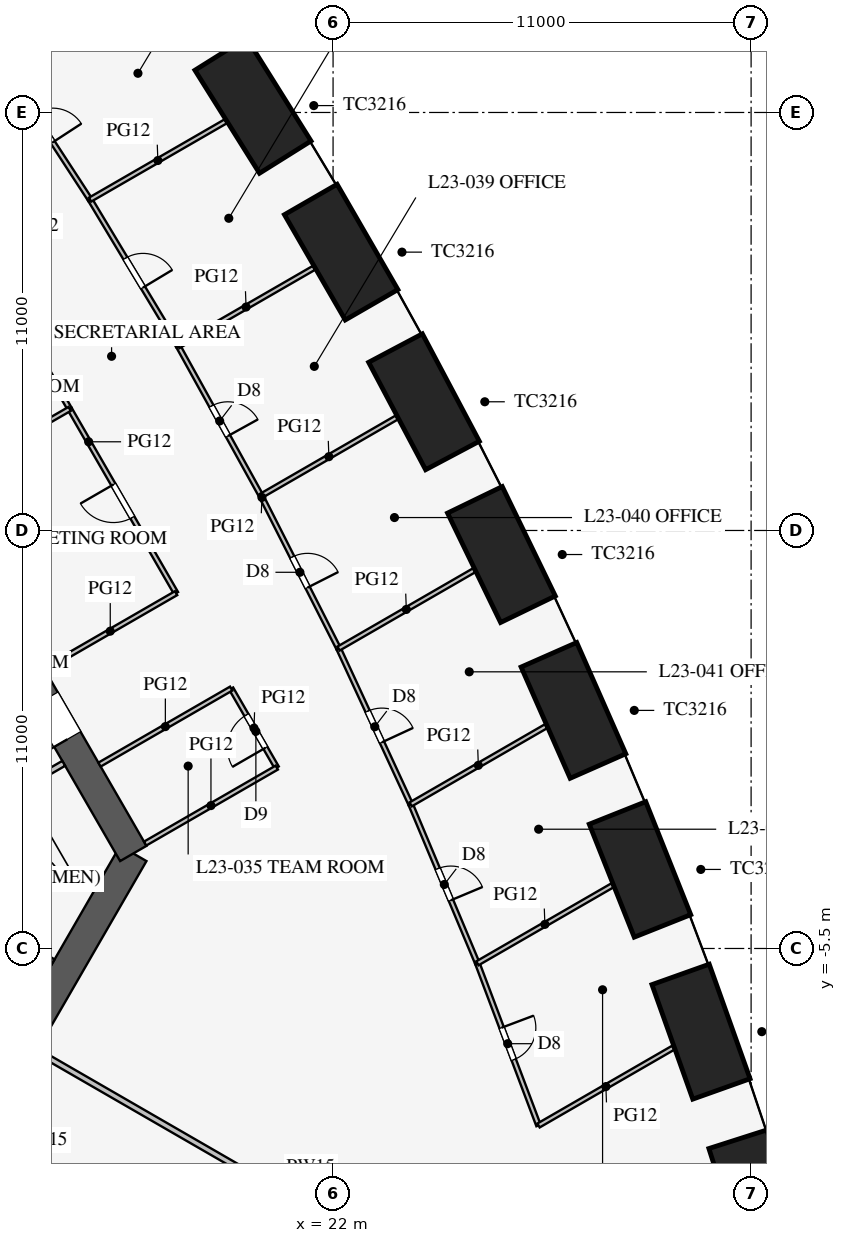
"""IFC4 building model, lengths in metres.
Left out: names, types, materials, properties, quantities, classifications, styles, units other than length and angle.
Written with IfcOpenShell. Run it as: python <this file> out.ifc"""

import sys

from ifc_helpers import new_model, si_unit, direction, frame, frame_2d, origin, origin_2d, place, context, subcontext, project, spatial, rectangle, extrude, element, fill, save


model = new_model("IFC4")
c1 = context("Model", 3, precision=1e-05, world=origin(), true_north=direction((0.0, 1.0)))
c2 = subcontext(c1, "Body", "Model", "MODEL_VIEW")
j1 = project(units=[si_unit("LENGTHUNIT", "METRE"), si_unit("PLANEANGLEUNIT", "RADIAN")], contexts=[c1])
p1 = place(None, origin())
s1 = spatial("IfcSite", under=j1, at=p1, CompositionType="ELEMENT")
p2 = place(p1, origin())
s2 = spatial("IfcBuilding", under=s1, at=p2, CompositionType="ELEMENT")
p3 = place(p2, frame((0.0, 0.0, 103.1)))
s3 = spatial("IfcBuildingStorey", under=s2, at=p3, CompositionType="ELEMENT", Elevation=103.1)
for number, where, z_axis, x_axis in (
    (1, (33.139, -12.044, 0.0), (0.0, 0.0, 1.0), (-0.305, 0.952, 0.0)),
    (2, (31.682, -7.689, 0.0), (0.0, 0.0, 1.0), (-0.336, 0.942, 0.0)),
    (3, (30.077, -3.42, 0.0), (0.0, 0.0, 1.0), (-0.37, 0.929, 0.0)),
    (4, (28.325, 0.765, 0.0), (0.0, 0.0, 1.0), (-0.403, 0.915, 0.0)),
    (5, (26.43, 4.867, 0.0), (0.0, 0.0, 1.0), (-0.436, 0.9, 0.0)),
    (6, (24.393, 8.887, 0.0), (0.0, 0.0, 1.0), (-0.468, 0.883, 0.0)),
    (7, (22.213, 12.825, 0.0), (0.0, 0.0, 1.0), (-0.5, 0.866, 0.0)),
    (8, (19.893, 16.681, 0.0), (0.0, 0.0, 1.0), (-0.531, 0.847, 0.0)),
):
    element("IfcColumn", number, at=place(p3, frame(where, z_axis=z_axis, x_axis=x_axis)), inside=s3, PredefinedType="COLUMN", context=c2, shape_type="SweptSolid", body=[
        extrude(rectangle(XDim=3.2, YDim=1.6, at=origin_2d()), origin(), (0.0, 0.0, 1.0), 4.2),
    ])
p4 = place(p3, frame((10.97, -13.0, 0.0), z_axis=(0.0, 0.0, 1.0), x_axis=(0.499995765644, 0.866027848477, 0.0)))
e9 = element("IfcWall", 9, at=p4, inside=s3, PredefinedType="SHEAR", context=c2, shape_type="SweptSolid", body=[
    extrude(rectangle(XDim=11.547, YDim=0.8, at=frame_2d((5.773, 0.0))), origin(), (0.0, 0.0, 1.0), 4.2),
])
p5 = place(p3, frame((16.743, -3.0, 0.0), z_axis=(0.0, 0.0, 1.0), x_axis=(-0.500002442456, 0.866023993627, 0.0)))
e10 = element("IfcWall", 10, at=p5, inside=s3, PredefinedType="SHEAR", context=c2, shape_type="SweptSolid", body=[
    extrude(rectangle(XDim=21.939, YDim=0.8, at=frame_2d((10.97, 0.0))), origin(), (0.0, 0.0, 1.0), 4.2),
])
p6 = place(p5, frame((17.27, 0.0, 0.0)))
e11 = element("IfcOpeningElement", 11, at=p6, cuts=e10, PredefinedType="OPENING", context=c2, shape_type="SweptSolid", body=[
    extrude(rectangle(XDim=1.2, YDim=2.1, at=frame_2d((0.6, 1.05))), frame((0.0, 0.41, 0.0), z_axis=(0.0, -1.0, 0.0), x_axis=(1.0, 0.0, 0.0)), (0.0, 0.0, 1.0), 0.82),
])
p7 = place(p5, frame((3.47, 0.0, 0.0)))
e12 = element("IfcOpeningElement", 12, at=p7, cuts=e10, PredefinedType="OPENING", context=c2, shape_type="SweptSolid", body=[
    extrude(rectangle(XDim=1.2, YDim=2.1, at=frame_2d((0.6, 1.05))), frame((0.0, 0.41, 0.0), z_axis=(0.0, -1.0, 0.0), x_axis=(1.0, 0.0, 0.0)), (0.0, 0.0, 1.0), 0.82),
])
p8 = place(p3, frame((6.663, -1.509, 0.0), z_axis=(0.0, 0.0, 1.0), x_axis=(0.866019375473, -0.500010441196, 0.0)))
e13 = element("IfcWall", 13, at=p8, inside=s3, PredefinedType="SHEAR", context=c2, shape_type="SweptSolid", body=[
    extrude(rectangle(XDim=9.075, YDim=0.6, at=frame_2d((4.538, 0.0))), origin(), (0.0, 0.0, 1.0), 4.2),
])
p9 = place(p3, frame((10.495, -3.178, 0.0), z_axis=(0.0, 0.0, 1.0), x_axis=(0.86602216432, 0.500005610874, 0.0)))
e14 = element("IfcWall", 14, at=p9, inside=s3, PredefinedType="PARTITIONING", context=c2, shape_type="SweptSolid", body=[
    extrude(rectangle(XDim=5.1, YDim=0.15, at=frame_2d((2.55, 0.0))), origin(), (0.0, 0.0, 1.0), 4.0),
])
p10 = place(p9, frame((2.6, 0.0, 0.0)))
e15 = element("IfcOpeningElement", 15, at=p10, cuts=e14, PredefinedType="OPENING", context=c2, shape_type="SweptSolid", body=[
    extrude(rectangle(XDim=0.9, YDim=2.1, at=frame_2d((0.45, 1.05))), frame((0.0, 0.085, 0.0), z_axis=(0.0, -1.0, 0.0), x_axis=(1.0, 0.0, 0.0)), (0.0, 0.0, 1.0), 0.17),
])
p11 = place(p3, frame((14.203, -8.2, 0.0), z_axis=(0.0, 0.0, 1.0), x_axis=(0.866024668836, -0.500001272966, 0.0)))
e16 = element("IfcWall", 16, at=p11, inside=s3, PredefinedType="PARTITIONING", context=c2, shape_type="SweptSolid", body=[
    extrude(rectangle(XDim=16.65, YDim=0.15, at=frame_2d((8.325, 0.0))), origin(), (0.0, 0.0, 1.0), 2.3),
])
p12 = place(p3, frame((15.069, 8.7, 0.0), z_axis=(0.0, 0.0, 1.0), x_axis=(-0.500012057535, 0.866018442252, 0.0)))
e17 = element("IfcWall", 17, at=p12, inside=s3, PredefinedType="PARTITIONING", context=c2, shape_type="SweptSolid", body=[
    extrude(rectangle(XDim=3.6, YDim=0.12, at=frame_2d((1.8, 0.0))), origin(), (0.0, 0.0, 1.0), 2.9),
])
p13 = place(p12, frame((1.3, 0.0, 0.15)))
e18 = element("IfcOpeningElement", 18, at=p13, cuts=e17, PredefinedType="OPENING", context=c2, shape_type="SweptSolid", body=[
    extrude(rectangle(XDim=1.0, YDim=2.1, at=frame_2d((0.5, 1.05))), frame((0.0, 0.07, 0.0), z_axis=(0.0, -1.0, 0.0), x_axis=(1.0, 0.0, 0.0)), (0.0, 0.0, 1.0), 0.14),
])
p14 = place(p3, frame((20.519, -0.74, 0.0), z_axis=(0.0, 0.0, 1.0), x_axis=(-0.499957262057, 0.866050077142, 0.0)))
e19 = element("IfcWall", 19, at=p14, inside=s3, PredefinedType="PARTITIONING", context=c2, shape_type="SweptSolid", body=[
    extrude(rectangle(XDim=2.4, YDim=0.12, at=frame_2d((1.2, 0.0))), origin(), (0.0, 0.0, 1.0), 2.9),
])
p15 = place(p14, frame((0.6, 0.0, 0.15)))
e20 = element("IfcOpeningElement", 20, at=p15, cuts=e19, PredefinedType="OPENING", context=c2, shape_type="SweptSolid", body=[
    extrude(rectangle(XDim=1.0, YDim=2.1, at=frame_2d((0.5, 1.05))), frame((0.0, 0.07, 0.0), z_axis=(0.0, -1.0, 0.0), x_axis=(1.0, 0.0, 0.0)), (0.0, 0.0, 1.0), 0.14),
])
p16 = place(p3, frame((17.869, 3.85, 0.0), z_axis=(0.0, 0.0, 1.0), x_axis=(-0.500016814911, 0.866015695474, 0.0)))
e21 = element("IfcWall", 21, at=p16, inside=s3, PredefinedType="PARTITIONING", context=c2, shape_type="SweptSolid", body=[
    extrude(rectangle(XDim=5.6, YDim=0.12, at=frame_2d((2.8, 0.0))), origin(), (0.0, 0.0, 1.0), 2.9),
])
p17 = place(p16, frame((2.3, 0.0, 0.15)))
e22 = element("IfcOpeningElement", 22, at=p17, cuts=e21, PredefinedType="OPENING", context=c2, shape_type="SweptSolid", body=[
    extrude(rectangle(XDim=1.0, YDim=2.1, at=frame_2d((0.5, 1.05))), frame((0.0, 0.07, 0.0), z_axis=(0.0, -1.0, 0.0), x_axis=(1.0, 0.0, 0.0)), (0.0, 0.0, 1.0), 0.14),
])
p18 = place(p3, frame((11.605, 6.7, 0.0), z_axis=(0.0, 0.0, 1.0), x_axis=(0.866026010844, 0.49999894854, 0.0)))
e23 = element("IfcWall", 23, at=p18, inside=s3, PredefinedType="PARTITIONING", context=c2, shape_type="SweptSolid", body=[
    extrude(rectangle(XDim=4.0, YDim=0.12, at=frame_2d((2.0, 0.0))), origin(), (0.0, 0.0, 1.0), 2.4),
])
for number, where, z_axis, x_axis in (
    (24, (17.055, -2.74, 0.0), (0.0, 0.0, 1.0), (0.866, 0.5, 0.0)),
    (25, (14.405, 1.85, 0.0), (0.0, 0.0, 1.0), (0.866, 0.5, 0.0)),
    (26, (15.855, -0.661, 0.0), (0.0, 0.0, 1.0), (0.866, 0.5, 0.0)),
):
    element("IfcWall", number, at=place(p3, frame(where, z_axis=z_axis, x_axis=x_axis)), inside=s3, PredefinedType="PARTITIONING", context=c2, shape_type="SweptSolid", body=[
        extrude(rectangle(XDim=4.0, YDim=0.12, at=frame_2d((2.0, 0.0))), origin(), (0.0, 0.0, 1.0), 2.9),
    ])
p19 = place(p3, frame((17.927, 10.35, 0.0), z_axis=(0.0, 0.0, 1.0), x_axis=(-0.515548366618, 0.856860479703, 0.0)))
e27 = element("IfcWall", 27, at=p19, inside=s3, PredefinedType="PARTITIONING", context=c2, shape_type="SweptSolid", body=[
    extrude(rectangle(XDim=4.501, YDim=0.12, at=frame_2d((2.25, 0.0))), origin(), (0.0, 0.0, 1.0), 2.9),
])
p20 = place(p19, frame((1.8, 0.0, 0.15)))
e28 = element("IfcOpeningElement", 28, at=p20, cuts=e27, PredefinedType="OPENING", context=c2, shape_type="SweptSolid", body=[
    extrude(rectangle(XDim=0.9, YDim=2.1, at=frame_2d((0.45, 1.05))), frame((0.0, 0.07, 0.0), z_axis=(0.0, -1.0, 0.0), x_axis=(1.0, 0.0, 0.0)), (0.0, 0.0, 1.0), 0.14),
])
p21 = place(p3, frame((15.606, 14.206, 0.0), z_axis=(0.0, 0.0, 1.0), x_axis=(-0.546069464151, 0.837739900161, 0.0)))
e29 = element("IfcWall", 29, at=p21, inside=s3, PredefinedType="PARTITIONING", context=c2, shape_type="SweptSolid", body=[
    extrude(rectangle(XDim=4.507, YDim=0.12, at=frame_2d((2.253, 0.0))), origin(), (0.0, 0.0, 1.0), 2.9),
])
p22 = place(p21, frame((1.8, 0.0, 0.15)))
e30 = element("IfcOpeningElement", 30, at=p22, cuts=e29, PredefinedType="OPENING", context=c2, shape_type="SweptSolid", body=[
    extrude(rectangle(XDim=0.9, YDim=2.1, at=frame_2d((0.45, 1.05))), frame((0.0, 0.07, 0.0), z_axis=(0.0, -1.0, 0.0), x_axis=(1.0, 0.0, 0.0)), (0.0, 0.0, 1.0), 0.14),
])
p23 = place(p3, frame((24.043, -1.708, 0.0), z_axis=(0.0, 0.0, 1.0), x_axis=(-0.41992827805, 0.90755729367, 0.0)))
e31 = element("IfcWall", 31, at=p23, inside=s3, PredefinedType="PARTITIONING", context=c2, shape_type="SweptSolid", body=[
    extrude(rectangle(XDim=4.519, YDim=0.12, at=frame_2d((2.259, 0.0))), origin(), (0.0, 0.0, 1.0), 2.9),
])
p24 = place(p23, frame((1.8, 0.0, 0.15)))
e32 = element("IfcOpeningElement", 32, at=p24, cuts=e31, PredefinedType="OPENING", context=c2, shape_type="SweptSolid", body=[
    extrude(rectangle(XDim=0.9, YDim=2.1, at=frame_2d((0.45, 1.05))), frame((0.0, 0.07, 0.0), z_axis=(0.0, -1.0, 0.0), x_axis=(1.0, 0.0, 0.0)), (0.0, 0.0, 1.0), 0.14),
])
p25 = place(p3, frame((25.797, -5.891, 0.0), z_axis=(0.0, 0.0, 1.0), x_axis=(-0.386762112496, 0.922179520667, 0.0)))
e33 = element("IfcWall", 33, at=p25, inside=s3, PredefinedType="PARTITIONING", context=c2, shape_type="SweptSolid", body=[
    extrude(rectangle(XDim=4.536, YDim=0.12, at=frame_2d((2.268, 0.0))), origin(), (0.0, 0.0, 1.0), 2.9),
])
p26 = place(p25, frame((1.8, 0.0, 0.15)))
e34 = element("IfcOpeningElement", 34, at=p26, cuts=e33, PredefinedType="OPENING", context=c2, shape_type="SweptSolid", body=[
    extrude(rectangle(XDim=0.9, YDim=2.1, at=frame_2d((0.45, 1.05))), frame((0.0, 0.07, 0.0), z_axis=(0.0, -1.0, 0.0), x_axis=(1.0, 0.0, 0.0)), (0.0, 0.0, 1.0), 0.14),
])
p27 = place(p3, frame((27.406, -10.158, 0.0), z_axis=(0.0, 0.0, 1.0), x_axis=(-0.352894560512, 0.93566309597, 0.0)))
e35 = element("IfcWall", 35, at=p27, inside=s3, PredefinedType="PARTITIONING", context=c2, shape_type="SweptSolid", body=[
    extrude(rectangle(XDim=4.561, YDim=0.12, at=frame_2d((2.28, 0.0))), origin(), (0.0, 0.0, 1.0), 2.9),
])
p28 = place(p27, frame((1.85, 0.0, 0.15)))
e36 = element("IfcOpeningElement", 36, at=p28, cuts=e35, PredefinedType="OPENING", context=c2, shape_type="SweptSolid", body=[
    extrude(rectangle(XDim=0.9, YDim=2.1, at=frame_2d((0.45, 1.05))), frame((0.0, 0.07, 0.0), z_axis=(0.0, -1.0, 0.0), x_axis=(1.0, 0.0, 0.0)), (0.0, 0.0, 1.0), 0.14),
])
p29 = place(p3, frame((20.106, 6.412, 0.0), z_axis=(0.0, 0.0, 1.0), x_axis=(-0.484292898211, 0.874905931368, 0.0)))
e37 = element("IfcWall", 37, at=p29, inside=s3, PredefinedType="PARTITIONING", context=c2, shape_type="SweptSolid", body=[
    extrude(rectangle(XDim=4.501, YDim=0.12, at=frame_2d((2.25, 0.0))), origin(), (0.0, 0.0, 1.0), 2.9),
])
p30 = place(p29, frame((1.8, 0.0, 0.15)))
e38 = element("IfcOpeningElement", 38, at=p30, cuts=e37, PredefinedType="OPENING", context=c2, shape_type="SweptSolid", body=[
    extrude(rectangle(XDim=0.9, YDim=2.1, at=frame_2d((0.45, 1.05))), frame((0.0, 0.07, 0.0), z_axis=(0.0, -1.0, 0.0), x_axis=(1.0, 0.0, 0.0)), (0.0, 0.0, 1.0), 0.14),
])
p31 = place(p3, frame((22.145, 2.393, 0.0), z_axis=(0.0, 0.0, 1.0), x_axis=(-0.452471679136, 0.891778772779, 0.0)))
e39 = element("IfcWall", 39, at=p31, inside=s3, PredefinedType="PARTITIONING", context=c2, shape_type="SweptSolid", body=[
    extrude(rectangle(XDim=4.507, YDim=0.12, at=frame_2d((2.253, 0.0))), origin(), (0.0, 0.0, 1.0), 2.9),
])
p32 = place(p31, frame((1.8, 0.0, 0.15)))
e40 = element("IfcOpeningElement", 40, at=p32, cuts=e39, PredefinedType="OPENING", context=c2, shape_type="SweptSolid", body=[
    extrude(rectangle(XDim=0.9, YDim=2.1, at=frame_2d((0.45, 1.05))), frame((0.0, 0.07, 0.0), z_axis=(0.0, -1.0, 0.0), x_axis=(1.0, 0.0, 0.0)), (0.0, 0.0, 1.0), 0.14),
])
p33 = place(p3, frame((17.927, 10.35, 0.0), z_axis=(0.0, 0.0, 1.0), x_axis=(0.866009926209, 0.50002680699, 0.0)))
e41 = element("IfcWall", 41, at=p33, inside=s3, PredefinedType="PARTITIONING", context=c2, shape_type="SweptSolid", body=[
    extrude(rectangle(XDim=4.12, YDim=0.12, at=frame_2d((2.06, 0.0))), origin(), (0.0, 0.0, 1.0), 2.4),
])
p34 = place(p3, frame((15.606, 14.206, 0.0), z_axis=(0.0, 0.0, 1.0), x_axis=(0.866016800201, 0.500014901547, 0.0)))
e42 = element("IfcWall", 42, at=p34, inside=s3, PredefinedType="PARTITIONING", context=c2, shape_type="SweptSolid", body=[
    extrude(rectangle(XDim=4.119, YDim=0.12, at=frame_2d((2.06, 0.0))), origin(), (0.0, 0.0, 1.0), 2.4),
])
p35 = place(p3, frame((13.145, 17.982, 0.0), z_axis=(0.0, 0.0, 1.0), x_axis=(0.866018637367, 0.500011719595, 0.0)))
e43 = element("IfcWall", 43, at=p35, inside=s3, PredefinedType="PARTITIONING", context=c2, shape_type="SweptSolid", body=[
    extrude(rectangle(XDim=4.116, YDim=0.12, at=frame_2d((2.058, 0.0))), origin(), (0.0, 0.0, 1.0), 2.6),
])
p36 = place(p3, frame((24.043, -1.708, 0.0), z_axis=(0.0, 0.0, 1.0), x_axis=(0.866019409031, 0.500010383074, 0.0)))
e44 = element("IfcWall", 44, at=p36, inside=s3, PredefinedType="PARTITIONING", context=c2, shape_type="SweptSolid", body=[
    extrude(rectangle(XDim=4.11, YDim=0.12, at=frame_2d((2.055, 0.0))), origin(), (0.0, 0.0, 1.0), 2.2),
])
p37 = place(p3, frame((25.797, -5.891, 0.0), z_axis=(0.0, 0.0, 1.0), x_axis=(0.866019112135, 0.500010897298, 0.0)))
e45 = element("IfcWall", 45, at=p37, inside=s3, PredefinedType="PARTITIONING", context=c2, shape_type="SweptSolid", body=[
    extrude(rectangle(XDim=4.103, YDim=0.12, at=frame_2d((2.052, 0.0))), origin(), (0.0, 0.0, 1.0), 2.4),
])
p38 = place(p3, frame((27.406, -10.158, 0.0), z_axis=(0.0, 0.0, 1.0), x_axis=(0.86601374377, 0.500020195194, 0.0)))
e46 = element("IfcWall", 46, at=p38, inside=s3, PredefinedType="PARTITIONING", context=c2, shape_type="SweptSolid", body=[
    extrude(rectangle(XDim=4.093, YDim=0.12, at=frame_2d((2.046, 0.0))), origin(), (0.0, 0.0, 1.0), 2.6),
])
p39 = place(p3, frame((20.106, 6.412, 0.0), z_axis=(0.0, 0.0, 1.0), x_axis=(0.866016800201, 0.500014901547, 0.0)))
e47 = element("IfcWall", 47, at=p39, inside=s3, PredefinedType="PARTITIONING", context=c2, shape_type="SweptSolid", body=[
    extrude(rectangle(XDim=4.119, YDim=0.12, at=frame_2d((2.06, 0.0))), origin(), (0.0, 0.0, 1.0), 2.4),
])
p40 = place(p3, frame((22.145, 2.393, 0.0), z_axis=(0.0, 0.0, 1.0), x_axis=(0.866018637367, 0.500011719595, 0.0)))
e48 = element("IfcWall", 48, at=p40, inside=s3, PredefinedType="PARTITIONING", context=c2, shape_type="SweptSolid", body=[
    extrude(rectangle(XDim=4.116, YDim=0.12, at=frame_2d((2.058, 0.0))), origin(), (0.0, 0.0, 1.0), 2.6),
])
p41 = place(p7, origin())
e49 = element("IfcDoor", 49, at=p41, inside=s3, OperationType="SINGLE_SWING_LEFT", PredefinedType="DOOR", context=c2, shape_type="SweptSolid", body=[
    extrude(rectangle(XDim=1.2, YDim=2.1, at=frame_2d((0.6, 1.05))), frame((0.0, 0.025, 0.0), z_axis=(0.0, -1.0, 0.0), x_axis=(1.0, 0.0, 0.0)), (0.0, 0.0, 1.0), 0.05),
])
fill(e12, e49)
p42 = place(p17, origin())
e50 = element("IfcDoor", 50, at=p42, inside=s3, OperationType="SINGLE_SWING_RIGHT", PredefinedType="DOOR", context=c2, shape_type="SweptSolid", body=[
    extrude(rectangle(XDim=1.0, YDim=2.1, at=frame_2d((0.5, 1.05))), frame((0.0, 0.025, 0.0), z_axis=(0.0, -1.0, 0.0), x_axis=(1.0, 0.0, 0.0)), (0.0, 0.0, 1.0), 0.05),
])
fill(e22, e50)
p43 = place(p15, origin())
e51 = element("IfcDoor", 51, at=p43, inside=s3, OperationType="SINGLE_SWING_LEFT", PredefinedType="DOOR", context=c2, shape_type="SweptSolid", body=[
    extrude(rectangle(XDim=1.0, YDim=2.1, at=frame_2d((0.5, 1.05))), frame((0.0, 0.025, 0.0), z_axis=(0.0, -1.0, 0.0), x_axis=(1.0, 0.0, 0.0)), (0.0, 0.0, 1.0), 0.05),
])
fill(e20, e51)
p44 = place(p22, frame((0.9, 0.0, 0.0), z_axis=(0.0, 0.0, 1.0), x_axis=(-1.0, 0.0, 0.0)))
e52 = element("IfcDoor", 52, at=p44, inside=s3, OperationType="SINGLE_SWING_RIGHT", PredefinedType="DOOR", context=c2, shape_type="SweptSolid", body=[
    extrude(rectangle(XDim=0.9, YDim=2.1, at=frame_2d((0.45, 1.05))), frame((0.0, 0.025, 0.0), z_axis=(0.0, -1.0, 0.0), x_axis=(1.0, 0.0, 0.0)), (0.0, 0.0, 1.0), 0.05),
])
fill(e30, e52)
p45 = place(p20, frame((0.9, 0.0, 0.0), z_axis=(0.0, 0.0, 1.0), x_axis=(-1.0, 0.0, 0.0)))
e53 = element("IfcDoor", 53, at=p45, inside=s3, OperationType="SINGLE_SWING_RIGHT", PredefinedType="DOOR", context=c2, shape_type="SweptSolid", body=[
    extrude(rectangle(XDim=0.9, YDim=2.1, at=frame_2d((0.45, 1.05))), frame((0.0, 0.025, 0.0), z_axis=(0.0, -1.0, 0.0), x_axis=(1.0, 0.0, 0.0)), (0.0, 0.0, 1.0), 0.05),
])
fill(e28, e53)
p46 = place(p30, frame((0.9, 0.0, 0.0), z_axis=(0.0, 0.0, 1.0), x_axis=(-1.0, 0.0, 0.0)))
e54 = element("IfcDoor", 54, at=p46, inside=s3, OperationType="SINGLE_SWING_RIGHT", PredefinedType="DOOR", context=c2, shape_type="SweptSolid", body=[
    extrude(rectangle(XDim=0.9, YDim=2.1, at=frame_2d((0.45, 1.05))), frame((0.0, 0.025, 0.0), z_axis=(0.0, -1.0, 0.0), x_axis=(1.0, 0.0, 0.0)), (0.0, 0.0, 1.0), 0.05),
])
fill(e38, e54)
p47 = place(p32, frame((0.9, 0.0, 0.0), z_axis=(0.0, 0.0, 1.0), x_axis=(-1.0, 0.0, 0.0)))
e55 = element("IfcDoor", 55, at=p47, inside=s3, OperationType="SINGLE_SWING_RIGHT", PredefinedType="DOOR", context=c2, shape_type="SweptSolid", body=[
    extrude(rectangle(XDim=0.9, YDim=2.1, at=frame_2d((0.45, 1.05))), frame((0.0, 0.025, 0.0), z_axis=(0.0, -1.0, 0.0), x_axis=(1.0, 0.0, 0.0)), (0.0, 0.0, 1.0), 0.05),
])
fill(e40, e55)
p48 = place(p24, frame((0.9, 0.0, 0.0), z_axis=(0.0, 0.0, 1.0), x_axis=(-1.0, 0.0, 0.0)))
e56 = element("IfcDoor", 56, at=p48, inside=s3, OperationType="SINGLE_SWING_RIGHT", PredefinedType="DOOR", context=c2, shape_type="SweptSolid", body=[
    extrude(rectangle(XDim=0.9, YDim=2.1, at=frame_2d((0.45, 1.05))), frame((0.0, 0.025, 0.0), z_axis=(0.0, -1.0, 0.0), x_axis=(1.0, 0.0, 0.0)), (0.0, 0.0, 1.0), 0.05),
])
fill(e32, e56)
p49 = place(p26, frame((0.9, 0.0, 0.0), z_axis=(0.0, 0.0, 1.0), x_axis=(-1.0, 0.0, 0.0)))
e57 = element("IfcDoor", 57, at=p49, inside=s3, OperationType="SINGLE_SWING_RIGHT", PredefinedType="DOOR", context=c2, shape_type="SweptSolid", body=[
    extrude(rectangle(XDim=0.9, YDim=2.1, at=frame_2d((0.45, 1.05))), frame((0.0, 0.025, 0.0), z_axis=(0.0, -1.0, 0.0), x_axis=(1.0, 0.0, 0.0)), (0.0, 0.0, 1.0), 0.05),
])
fill(e34, e57)
p50 = place(p28, frame((0.9, 0.0, 0.0), z_axis=(0.0, 0.0, 1.0), x_axis=(-1.0, 0.0, 0.0)))
e58 = element("IfcDoor", 58, at=p50, inside=s3, OperationType="SINGLE_SWING_LEFT", PredefinedType="DOOR", context=c2, shape_type="SweptSolid", body=[
    extrude(rectangle(XDim=0.9, YDim=2.1, at=frame_2d((0.45, 1.05))), frame((0.0, 0.025, 0.0), z_axis=(0.0, -1.0, 0.0), x_axis=(1.0, 0.0, 0.0)), (0.0, 0.0, 1.0), 0.05),
])
fill(e36, e58)
save(model, sys.argv[1])
